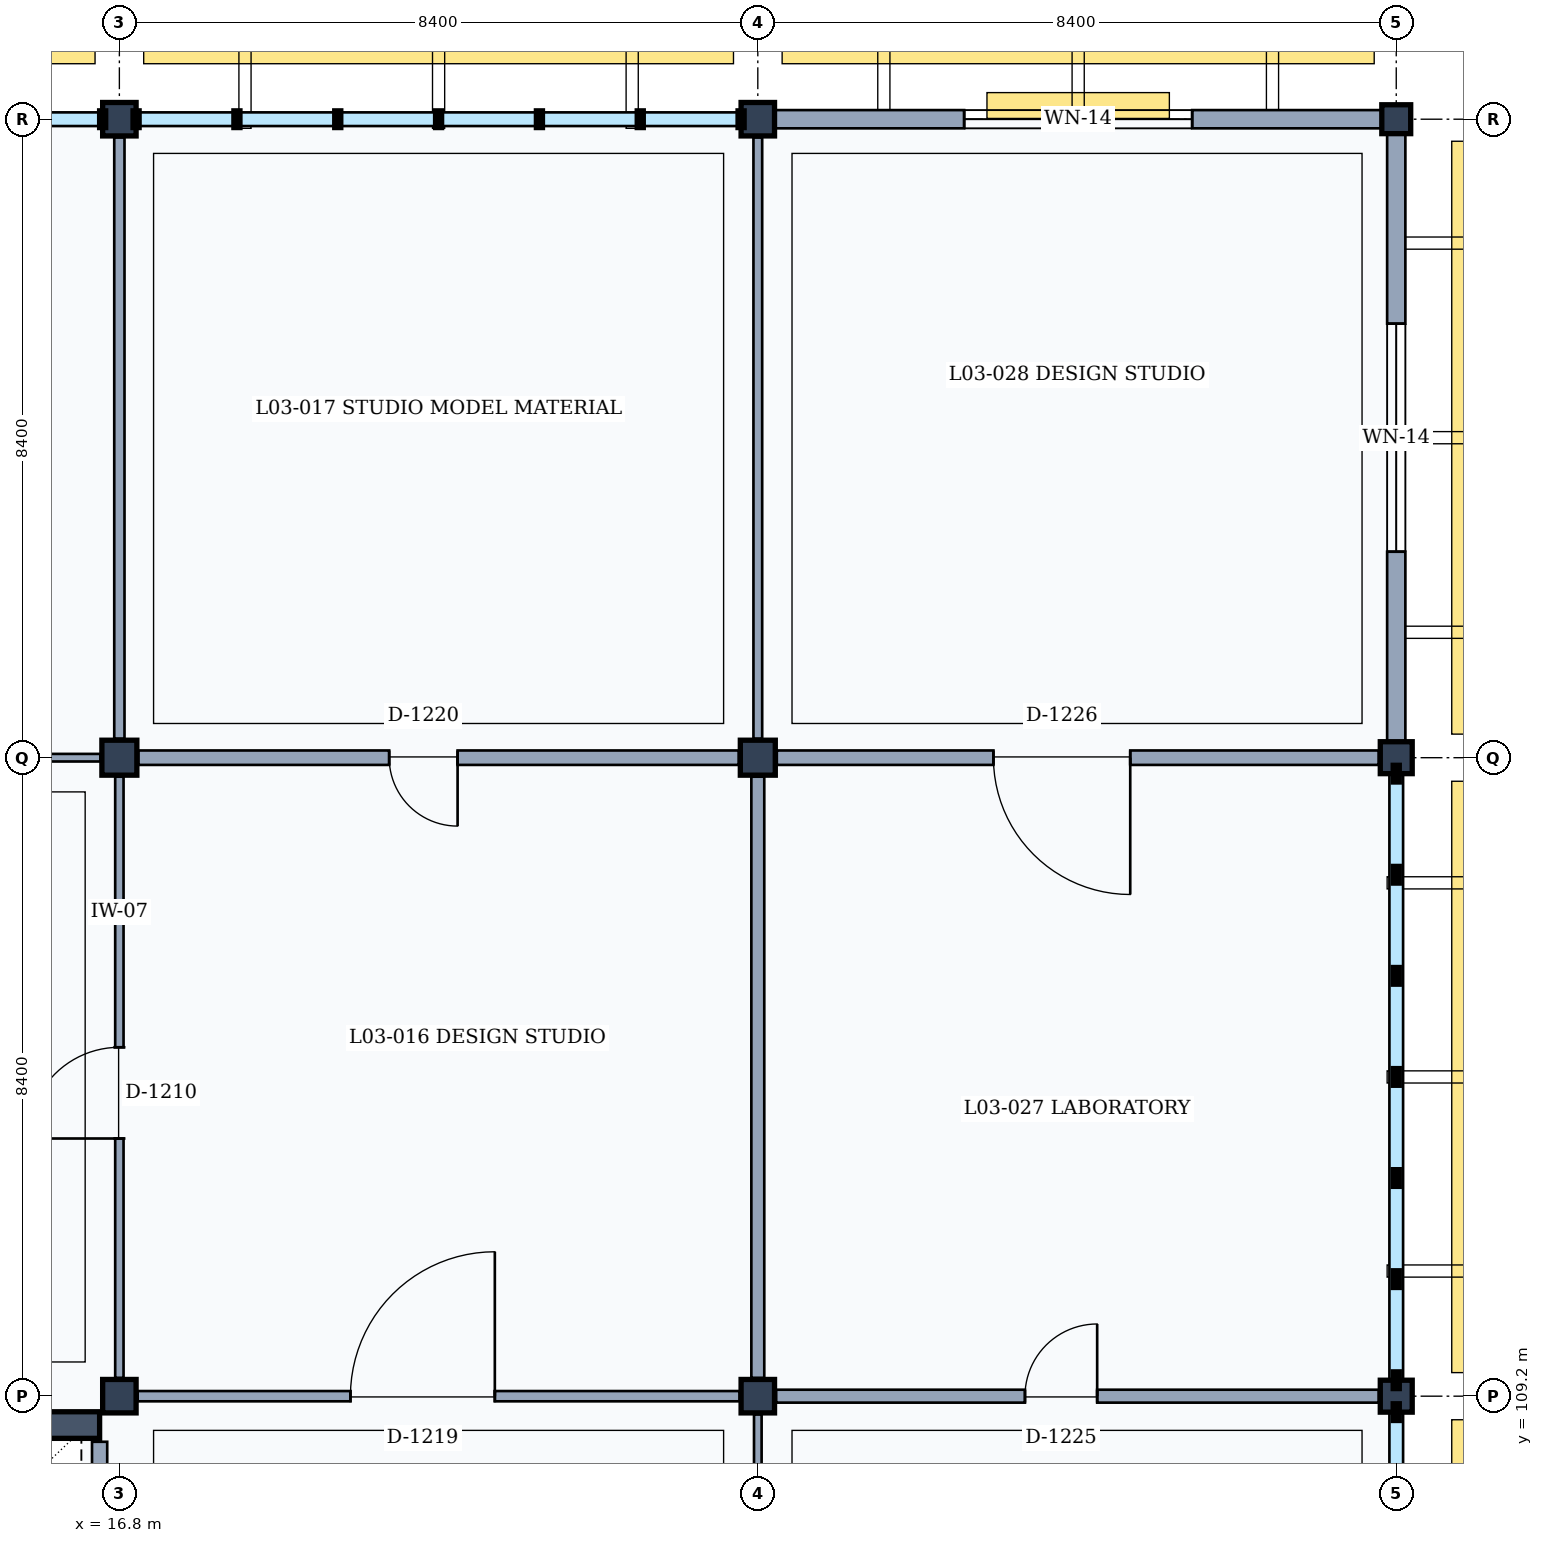
"""IFC4 building model, lengths in metres.
Left out: names, types, materials, properties, quantities, classifications, styles, units other than length and angle.
Written with IfcOpenShell. Run it as: python <this file> out.ifc"""

import sys

from ifc_helpers import new_model, si_unit, direction, frame, frame_2d, origin, origin_2d, place, context, subcontext, project, spatial, rectangle, extrude, element, fill, save


model = new_model("IFC4")
c1 = context("Model", 3, precision=1e-05, world=origin(), true_north=direction((0.0, 1.0)))
c2 = subcontext(c1, "Body", "Model", "MODEL_VIEW")
j1 = project(units=[si_unit("LENGTHUNIT", "METRE"), si_unit("PLANEANGLEUNIT", "RADIAN")], contexts=[c1])
p1 = place(None, origin())
s1 = spatial("IfcSite", under=j1, at=p1, CompositionType="ELEMENT")
p2 = place(p1, origin())
s2 = spatial("IfcBuilding", under=s1, at=p2, CompositionType="ELEMENT")
p3 = place(p2, frame((0.0, 0.0, 13.8)))
s3 = spatial("IfcBuildingStorey", under=s2, at=p3, CompositionType="ELEMENT", Elevation=13.8)
p4 = place(p3, frame((16.8, 109.2, 0.0), z_axis=(0.0, 0.0, 1.0), x_axis=(1.0, 0.0, 0.0)))
e1 = element("IfcColumn", 1, at=p4, inside=s3, PredefinedType="COLUMN", context=c2, shape_type="SweptSolid", body=[
    extrude(rectangle(XDim=0.44, YDim=0.44, at=origin_2d()), origin(), (0.0, 0.0, 1.0), 4.2),
])
p5 = place(p3, frame((16.8, 117.6, 0.0), z_axis=(0.0, 0.0, 1.0), x_axis=(1.0, 0.0, 0.0)))
e2 = element("IfcColumn", 2, at=p5, inside=s3, PredefinedType="COLUMN", context=c2, shape_type="SweptSolid", body=[
    extrude(rectangle(XDim=0.46, YDim=0.46, at=origin_2d()), origin(), (0.0, 0.0, 1.0), 4.2),
])
for number, where, z_axis, x_axis in (
    (3, (16.8, 126.0, 0.0), (0.0, 0.0, 1.0), (1.0, 0.0, 0.0)),
    (4, (25.2, 109.2, 0.0), (0.0, 0.0, 1.0), (1.0, 0.0, 0.0)),
):
    element("IfcColumn", number, at=place(p3, frame(where, z_axis=z_axis, x_axis=x_axis)), inside=s3, PredefinedType="COLUMN", context=c2, shape_type="SweptSolid", body=[
        extrude(rectangle(XDim=0.44, YDim=0.44, at=origin_2d()), origin(), (0.0, 0.0, 1.0), 4.2),
    ])
p6 = place(p3, frame((25.2, 117.6, 0.0), z_axis=(0.0, 0.0, 1.0), x_axis=(1.0, 0.0, 0.0)))
e5 = element("IfcColumn", 5, at=p6, inside=s3, PredefinedType="COLUMN", context=c2, shape_type="SweptSolid", body=[
    extrude(rectangle(XDim=0.46, YDim=0.46, at=origin_2d()), origin(), (0.0, 0.0, 1.0), 4.2),
])
p7 = place(p3, frame((25.2, 126.0, 0.0), z_axis=(0.0, 0.0, 1.0), x_axis=(1.0, 0.0, 0.0)))
e6 = element("IfcColumn", 6, at=p7, inside=s3, PredefinedType="COLUMN", context=c2, shape_type="SweptSolid", body=[
    extrude(rectangle(XDim=0.44, YDim=0.44, at=origin_2d()), origin(), (0.0, 0.0, 1.0), 4.2),
])
for number, where, z_axis, x_axis in (
    (7, (33.6, 109.2, 0.0), (0.0, 0.0, 1.0), (1.0, 0.0, 0.0)),
    (8, (33.6, 117.6, 0.0), (0.0, 0.0, 1.0), (1.0, 0.0, 0.0)),
):
    element("IfcColumn", number, at=place(p3, frame(where, z_axis=z_axis, x_axis=x_axis)), inside=s3, PredefinedType="COLUMN", context=c2, shape_type="SweptSolid", body=[
        extrude(rectangle(XDim=0.42, YDim=0.42, at=origin_2d()), origin(), (0.0, 0.0, 1.0), 4.2),
    ])
p8 = place(p3, frame((33.6, 126.0, 0.0), z_axis=(0.0, 0.0, 1.0), x_axis=(1.0, 0.0, 0.0)))
e9 = element("IfcColumn", 9, at=p8, inside=s3, PredefinedType="COLUMN", context=c2, shape_type="SweptSolid", body=[
    extrude(rectangle(XDim=0.38, YDim=0.38, at=origin_2d()), origin(), (0.0, 0.0, 1.0), 4.2),
])
p9 = place(p3, frame((25.42, 126.0, 0.0), z_axis=(0.0, 0.0, 1.0), x_axis=(1.0, 0.0, 0.0)))
e10 = element("IfcWall", 10, at=p9, inside=s3, PredefinedType="SOLIDWALL", context=c2, shape_type="SweptSolid", body=[
    extrude(rectangle(XDim=7.99, YDim=0.24, at=frame_2d((3.995, 0.0))), origin(), (0.0, 0.0, 1.0), 3.36),
])
p10 = place(p9, frame((2.495, 0.0, 0.9)))
e11 = element("IfcOpeningElement", 11, at=p10, cuts=e10, PredefinedType="OPENING", context=c2, shape_type="SweptSolid", body=[
    extrude(rectangle(XDim=3.0, YDim=1.8, at=frame_2d((1.5, 0.9))), frame((0.0, 0.13, 0.0), z_axis=(0.0, -1.0, 0.0), x_axis=(1.0, 0.0, 0.0)), (0.0, 0.0, 1.0), 0.26),
])
p11 = place(p3, frame((33.6, 125.81, 0.0), z_axis=(0.0, 0.0, 1.0), x_axis=(0.0, -1.0, 0.0)))
e12 = element("IfcWall", 12, at=p11, inside=s3, PredefinedType="SOLIDWALL", context=c2, shape_type="SweptSolid", body=[
    extrude(rectangle(XDim=8.0, YDim=0.24, at=frame_2d((4.0, 0.0))), origin(), (0.0, 0.0, 1.0), 3.36),
])
p12 = place(p11, frame((2.5, 0.0, 0.9)))
e13 = element("IfcOpeningElement", 13, at=p12, cuts=e12, PredefinedType="OPENING", context=c2, shape_type="SweptSolid", body=[
    extrude(rectangle(XDim=3.0, YDim=1.8, at=frame_2d((1.5, 0.9))), frame((0.0, 0.13, 0.0), z_axis=(0.0, -1.0, 0.0), x_axis=(1.0, 0.0, 0.0)), (0.0, 0.0, 1.0), 0.26),
])
p13 = place(p3, frame((8.665, 108.82, 0.0), z_axis=(0.0, 0.0, 1.0), x_axis=(1.0, 0.0, 0.0)))
e14 = element("IfcWall", 14, at=p13, inside=s3, PredefinedType="SHEAR", context=c2, shape_type="SweptSolid", body=[
    extrude(rectangle(XDim=7.875, YDim=0.35, at=frame_2d((3.938, 0.0))), origin(), (0.0, 0.0, 1.0), 3.98),
])
p14 = place(p3, frame((16.54, 108.6, 0.0), z_axis=(0.0, 0.0, 1.0), x_axis=(0.0, -1.0, 0.0)))
e15 = element("IfcWall", 15, at=p14, inside=s3, PredefinedType="PARTITIONING", context=c2, shape_type="SweptSolid", body=[
    extrude(rectangle(XDim=7.2, YDim=0.2, at=frame_2d((3.6, 0.0))), origin(), (0.0, 0.0, 1.0), 3.32),
])
p15 = place(p14, frame((3.55, 0.0, 0.0)))
e16 = element("IfcOpeningElement", 16, at=p15, cuts=e15, PredefinedType="OPENING", context=c2, shape_type="SweptSolid", body=[
    extrude(rectangle(XDim=1.1, YDim=2.15, at=frame_2d((0.55, 1.075))), frame((0.0, 0.11, 0.0), z_axis=(0.0, -1.0, 0.0), x_axis=(1.0, 0.0, 0.0)), (0.0, 0.0, 1.0), 0.22),
])
p16 = place(p3, frame((16.8, 109.44, 0.0), z_axis=(0.0, 0.0, 1.0), x_axis=(0.0, 1.0, 0.0)))
e17 = element("IfcWall", 17, at=p16, inside=s3, PredefinedType="PARTITIONING", context=c2, shape_type="SweptSolid", body=[
    extrude(rectangle(XDim=7.91, YDim=0.11, at=frame_2d((3.955, 0.0))), origin(), (0.0, 0.0, 1.0), 3.32),
])
p17 = place(p16, frame((3.15, 0.0, 0.0)))
e18 = element("IfcOpeningElement", 18, at=p17, cuts=e17, PredefinedType="OPENING", context=c2, shape_type="SweptSolid", body=[
    extrude(rectangle(XDim=1.2, YDim=2.2, at=frame_2d((0.6, 1.1))), frame((0.0, 0.065, 0.0), z_axis=(0.0, -1.0, 0.0), x_axis=(1.0, 0.0, 0.0)), (0.0, 0.0, 1.0), 0.13),
])
p18 = place(p3, frame((8.65, 117.6, 0.0), z_axis=(0.0, 0.0, 1.0), x_axis=(1.0, 0.0, 0.0)))
e19 = element("IfcWall", 19, at=p18, inside=s3, PredefinedType="MOVABLE", context=c2, shape_type="SweptSolid", body=[
    extrude(rectangle(XDim=7.9, YDim=0.1, at=frame_2d((3.95, 0.0))), origin(), (0.0, 0.0, 1.0), 3.32),
])
p19 = place(p18, frame((3.05, 0.0, 0.0)))
e20 = element("IfcOpeningElement", 20, at=p19, cuts=e19, PredefinedType="OPENING", context=c2, shape_type="SweptSolid", body=[
    extrude(rectangle(XDim=1.4, YDim=2.25, at=frame_2d((0.7, 1.125))), frame((0.0, 0.06, 0.0), z_axis=(0.0, -1.0, 0.0), x_axis=(1.0, 0.0, 0.0)), (0.0, 0.0, 1.0), 0.12),
])
p20 = place(p3, frame((16.8, 117.85, 0.0), z_axis=(0.0, 0.0, 1.0), x_axis=(0.0, 1.0, 0.0)))
e21 = element("IfcWall", 21, at=p20, inside=s3, PredefinedType="PARTITIONING", context=c2, shape_type="SweptSolid", body=[
    extrude(rectangle(XDim=7.91, YDim=0.135, at=frame_2d((3.955, 0.0))), origin(), (0.0, 0.0, 1.0), 3.32),
])
p21 = place(p3, frame((25.2, 101.05, 0.0), z_axis=(0.0, 0.0, 1.0), x_axis=(0.0, 1.0, 0.0)))
e22 = element("IfcWall", 22, at=p21, inside=s3, PredefinedType="MOVABLE", context=c2, shape_type="SweptSolid", body=[
    extrude(rectangle(XDim=7.91, YDim=0.1, at=frame_2d((3.955, 0.0))), origin(), (0.0, 0.0, 1.0), 3.32),
])
p22 = place(p21, frame((2.9, 0.0, 0.0)))
e23 = element("IfcOpeningElement", 23, at=p22, cuts=e22, PredefinedType="OPENING", context=c2, shape_type="SweptSolid", body=[
    extrude(rectangle(XDim=1.7, YDim=2.3, at=frame_2d((0.85, 1.15))), frame((0.0, 0.06, 0.0), z_axis=(0.0, -1.0, 0.0), x_axis=(1.0, 0.0, 0.0)), (0.0, 0.0, 1.0), 0.12),
])
p23 = place(p3, frame((17.04, 109.2, 0.0), z_axis=(0.0, 0.0, 1.0), x_axis=(1.0, 0.0, 0.0)))
e24 = element("IfcWall", 24, at=p23, inside=s3, PredefinedType="PARTITIONING", context=c2, shape_type="SweptSolid", body=[
    extrude(rectangle(XDim=7.92, YDim=0.135, at=frame_2d((3.96, 0.0))), origin(), (0.0, 0.0, 1.0), 3.32),
])
p24 = place(p23, frame((2.8, 0.0, 0.0)))
e25 = element("IfcOpeningElement", 25, at=p24, cuts=e24, PredefinedType="OPENING", context=c2, shape_type="SweptSolid", body=[
    extrude(rectangle(XDim=1.9, YDim=2.4, at=frame_2d((0.95, 1.2))), frame((0.0, 0.077, 0.0), z_axis=(0.0, -1.0, 0.0), x_axis=(1.0, 0.0, 0.0)), (0.0, 0.0, 1.0), 0.155),
])
p25 = place(p3, frame((25.2, 109.44, 0.0), z_axis=(0.0, 0.0, 1.0), x_axis=(0.0, 1.0, 0.0)))
e26 = element("IfcWall", 26, at=p25, inside=s3, PredefinedType="PARTITIONING", context=c2, shape_type="SweptSolid", body=[
    extrude(rectangle(XDim=7.91, YDim=0.17, at=frame_2d((3.955, 0.0))), origin(), (0.0, 0.0, 1.0), 3.32),
])
p26 = place(p3, frame((17.05, 117.6, 0.0), z_axis=(0.0, 0.0, 1.0), x_axis=(1.0, 0.0, 0.0)))
e27 = element("IfcWall", 27, at=p26, inside=s3, PredefinedType="PARTITIONING", context=c2, shape_type="SweptSolid", body=[
    extrude(rectangle(XDim=7.9, YDim=0.19, at=frame_2d((3.95, 0.0))), origin(), (0.0, 0.0, 1.0), 3.32),
])
p27 = place(p26, frame((3.3, 0.0, 0.0)))
e28 = element("IfcOpeningElement", 28, at=p27, cuts=e27, PredefinedType="OPENING", context=c2, shape_type="SweptSolid", body=[
    extrude(rectangle(XDim=0.9, YDim=2.1, at=frame_2d((0.45, 1.05))), frame((0.0, 0.105, 0.0), z_axis=(0.0, -1.0, 0.0), x_axis=(1.0, 0.0, 0.0)), (0.0, 0.0, 1.0), 0.21),
])
p28 = place(p3, frame((25.2, 117.85, 0.0), z_axis=(0.0, 0.0, 1.0), x_axis=(0.0, 1.0, 0.0)))
e29 = element("IfcWall", 29, at=p28, inside=s3, PredefinedType="PARTITIONING", context=c2, shape_type="SweptSolid", body=[
    extrude(rectangle(XDim=7.91, YDim=0.115, at=frame_2d((3.955, 0.0))), origin(), (0.0, 0.0, 1.0), 3.32),
])
p29 = place(p3, frame((25.44, 109.2, 0.0), z_axis=(0.0, 0.0, 1.0), x_axis=(1.0, 0.0, 0.0)))
e30 = element("IfcWall", 30, at=p29, inside=s3, PredefinedType="PARTITIONING", context=c2, shape_type="SweptSolid", body=[
    extrude(rectangle(XDim=7.93, YDim=0.17, at=frame_2d((3.965, 0.0))), origin(), (0.0, 0.0, 1.0), 3.32),
])
p30 = place(p29, frame((3.275, 0.0, 0.0)))
e31 = element("IfcOpeningElement", 31, at=p30, cuts=e30, PredefinedType="OPENING", context=c2, shape_type="SweptSolid", body=[
    extrude(rectangle(XDim=0.95, YDim=2.15, at=frame_2d((0.475, 1.075))), frame((0.0, 0.095, 0.0), z_axis=(0.0, -1.0, 0.0), x_axis=(1.0, 0.0, 0.0)), (0.0, 0.0, 1.0), 0.19),
])
p31 = place(p3, frame((25.45, 117.6, 0.0), z_axis=(0.0, 0.0, 1.0), x_axis=(1.0, 0.0, 0.0)))
e32 = element("IfcWall", 32, at=p31, inside=s3, PredefinedType="PARTITIONING", context=c2, shape_type="SweptSolid", body=[
    extrude(rectangle(XDim=7.92, YDim=0.19, at=frame_2d((3.96, 0.0))), origin(), (0.0, 0.0, 1.0), 3.32),
])
p32 = place(p31, frame((2.85, 0.0, 0.0)))
e33 = element("IfcOpeningElement", 33, at=p32, cuts=e32, PredefinedType="OPENING", context=c2, shape_type="SweptSolid", body=[
    extrude(rectangle(XDim=1.8, YDim=2.3, at=frame_2d((0.9, 1.15))), frame((0.0, 0.105, 0.0), z_axis=(0.0, -1.0, 0.0), x_axis=(1.0, 0.0, 0.0)), (0.0, 0.0, 1.0), 0.21),
])
p33 = place(p10, origin())
e34 = element("IfcWindow", 34, at=p33, inside=s3, PartitioningType="SINGLE_PANEL", PredefinedType="WINDOW", context=c2, shape_type="SweptSolid", body=[
    extrude(rectangle(XDim=3.0, YDim=1.8, at=frame_2d((1.5, 0.9))), frame((0.0, 0.03, 0.0), z_axis=(0.0, -1.0, 0.0), x_axis=(1.0, 0.0, 0.0)), (0.0, 0.0, 1.0), 0.06),
])
fill(e11, e34)
p34 = place(p12, origin())
e35 = element("IfcWindow", 35, at=p34, inside=s3, PartitioningType="SINGLE_PANEL", PredefinedType="WINDOW", context=c2, shape_type="SweptSolid", body=[
    extrude(rectangle(XDim=3.0, YDim=1.8, at=frame_2d((1.5, 0.9))), frame((0.0, 0.03, 0.0), z_axis=(0.0, -1.0, 0.0), x_axis=(1.0, 0.0, 0.0)), (0.0, 0.0, 1.0), 0.06),
])
fill(e13, e35)
p35 = place(p17, origin())
e36 = element("IfcDoor", 36, at=p35, inside=s3, OperationType="SINGLE_SWING_LEFT", PredefinedType="DOOR", context=c2, shape_type="SweptSolid", body=[
    extrude(rectangle(XDim=1.2, YDim=2.2, at=frame_2d((0.6, 1.1))), frame((0.0, 0.025, 0.0), z_axis=(0.0, -1.0, 0.0), x_axis=(1.0, 0.0, 0.0)), (0.0, 0.0, 1.0), 0.05),
])
fill(e18, e36)
p36 = place(p24, origin())
e37 = element("IfcDoor", 37, at=p36, inside=s3, OperationType="SINGLE_SWING_RIGHT", PredefinedType="DOOR", context=c2, shape_type="SweptSolid", body=[
    extrude(rectangle(XDim=1.9, YDim=2.4, at=frame_2d((0.95, 1.2))), frame((0.0, 0.025, 0.0), z_axis=(0.0, -1.0, 0.0), x_axis=(1.0, 0.0, 0.0)), (0.0, 0.0, 1.0), 0.05),
])
fill(e25, e37)
p37 = place(p27, frame((0.9, 0.0, 0.0), z_axis=(0.0, 0.0, 1.0), x_axis=(-1.0, 0.0, 0.0)))
e38 = element("IfcDoor", 38, at=p37, inside=s3, OperationType="SINGLE_SWING_LEFT", PredefinedType="DOOR", context=c2, shape_type="SweptSolid", body=[
    extrude(rectangle(XDim=0.9, YDim=2.1, at=frame_2d((0.45, 1.05))), frame((0.0, 0.025, 0.0), z_axis=(0.0, -1.0, 0.0), x_axis=(1.0, 0.0, 0.0)), (0.0, 0.0, 1.0), 0.05),
])
fill(e28, e38)
p38 = place(p30, origin())
e39 = element("IfcDoor", 39, at=p38, inside=s3, OperationType="SINGLE_SWING_RIGHT", PredefinedType="DOOR", context=c2, shape_type="SweptSolid", body=[
    extrude(rectangle(XDim=0.95, YDim=2.15, at=frame_2d((0.475, 1.075))), frame((0.0, 0.025, 0.0), z_axis=(0.0, -1.0, 0.0), x_axis=(1.0, 0.0, 0.0)), (0.0, 0.0, 1.0), 0.05),
])
fill(e31, e39)
p39 = place(p32, frame((1.8, 0.0, 0.0), z_axis=(0.0, 0.0, 1.0), x_axis=(-1.0, 0.0, 0.0)))
e40 = element("IfcDoor", 40, at=p39, inside=s3, OperationType="SINGLE_SWING_LEFT", PredefinedType="DOOR", context=c2, shape_type="SweptSolid", body=[
    extrude(rectangle(XDim=1.8, YDim=2.3, at=frame_2d((0.9, 1.15))), frame((0.0, 0.025, 0.0), z_axis=(0.0, -1.0, 0.0), x_axis=(1.0, 0.0, 0.0)), (0.0, 0.0, 1.0), 0.05),
])
fill(e33, e40)
save(model, sys.argv[1])
